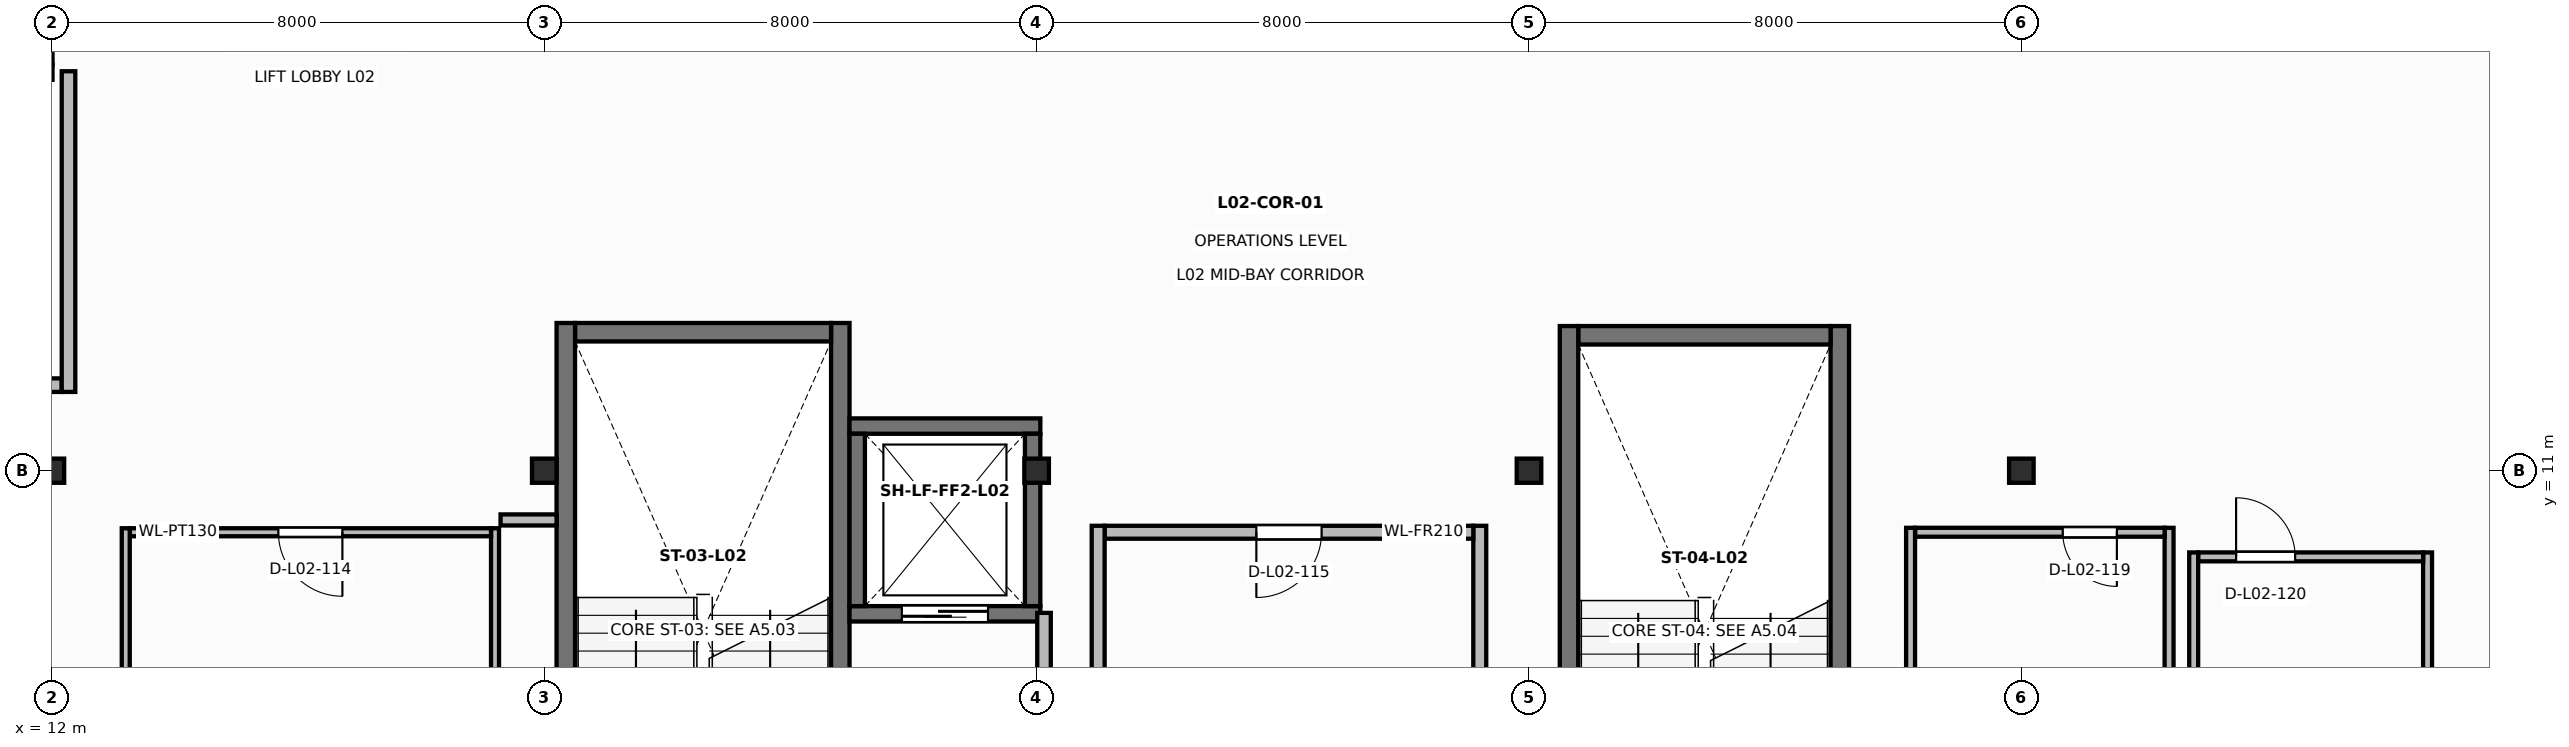
"""IFC4 building model, lengths in metres.
Left out: names, types, materials, properties, quantities, classifications, styles, units other than length and angle.
Written with IfcOpenShell. Run it as: python <this file> out.ifc"""

import sys

from ifc_helpers import new_model, si_unit, direction, frame, frame_2d, origin, origin_2d, place, context, subcontext, project, spatial, rectangle, i_section, extrude, element, fill, save


model = new_model("IFC4")
c1 = context("Model", 3, precision=1e-05, world=origin(), true_north=direction((0.0, 1.0)))
c2 = subcontext(c1, "Body", "Model", "MODEL_VIEW")
j1 = project(units=[si_unit("LENGTHUNIT", "METRE"), si_unit("PLANEANGLEUNIT", "RADIAN")], contexts=[c1])
p1 = place(None, origin())
s1 = spatial("IfcSite", under=j1, at=p1, CompositionType="ELEMENT")
p2 = place(p1, origin())
s2 = spatial("IfcBuilding", under=s1, at=p2, CompositionType="ELEMENT")
p3 = place(p2, frame((0.0, 0.0, 11.2)))
s3 = spatial("IfcBuildingStorey", under=s2, at=p3, CompositionType="ELEMENT", Elevation=11.2)
for number, where, z_axis, x_axis in (
    (1, (12.0, 11.0, 0.0), (0.0, 0.0, 1.0), (1.0, 0.0, 0.0)),
    (2, (20.0, 11.0, 0.0), (0.0, 0.0, 1.0), (1.0, 0.0, 0.0)),
    (3, (28.0, 11.0, 0.0), (0.0, 0.0, 1.0), (1.0, 0.0, 0.0)),
    (4, (36.0, 11.0, 0.0), (0.0, 0.0, 1.0), (1.0, 0.0, 0.0)),
    (5, (44.0, 11.0, 0.0), (0.0, 0.0, 1.0), (1.0, 0.0, 0.0)),
):
    element("IfcColumn", number, at=place(p3, frame(where, z_axis=z_axis, x_axis=x_axis)), inside=s3, PredefinedType="COLUMN", context=c2, shape_type="SweptSolid", body=[
        extrude(i_section(OverallWidth=0.399, OverallDepth=0.393, WebThickness=0.023, FlangeThickness=0.037, at=origin_2d()), origin(), (0.0, 0.0, 1.0), 4.4),
    ])
p4 = place(p3, frame((24.81, 3.4, 0.0), z_axis=(0.0, 0.0, 1.0), x_axis=(0.0, 1.0, 0.0)))
e6 = element("IfcWall", 6, at=p4, inside=s3, PredefinedType="SHEAR", context=c2, shape_type="SweptSolid", body=[
    extrude(rectangle(XDim=10.0, YDim=0.3, at=frame_2d((5.0, 0.0))), origin(), (0.0, 0.0, 1.0), 4.165),
])
p5 = place(p4, frame((0.75, 0.0, 0.0)))
e7 = element("IfcOpeningElement", 7, at=p5, cuts=e6, PredefinedType="OPENING", context=c2, shape_type="SweptSolid", body=[
    extrude(rectangle(XDim=1.1, YDim=2.15, at=frame_2d((0.55, 1.075))), frame((0.0, 0.16, 0.0), z_axis=(0.0, -1.0, 0.0), x_axis=(1.0, 0.0, 0.0)), (0.0, 0.0, 1.0), 0.32),
])
p6 = place(p3, frame((24.66, 13.25, 0.0), z_axis=(0.0, 0.0, 1.0), x_axis=(-1.0, 0.0, 0.0)))
e8 = element("IfcWall", 8, at=p6, inside=s3, PredefinedType="SHEAR", context=c2, shape_type="SweptSolid", body=[
    extrude(rectangle(XDim=4.16, YDim=0.3, at=frame_2d((2.08, 0.0))), origin(), (0.0, 0.0, 1.0), 4.165),
])
p7 = place(p3, frame((20.35, 13.4, 0.0), z_axis=(0.0, 0.0, 1.0), x_axis=(0.0, -1.0, 0.0)))
e9 = element("IfcWall", 9, at=p7, inside=s3, PredefinedType="SHEAR", context=c2, shape_type="SweptSolid", body=[
    extrude(rectangle(XDim=10.0, YDim=0.3, at=frame_2d((5.0, 0.0))), origin(), (0.0, 0.0, 1.0), 4.165),
])
p8 = place(p3, frame((41.05, 3.4, 0.0), z_axis=(0.0, 0.0, 1.0), x_axis=(0.0, 1.0, 0.0)))
e10 = element("IfcWall", 10, at=p8, inside=s3, PredefinedType="SHEAR", context=c2, shape_type="SweptSolid", body=[
    extrude(rectangle(XDim=9.95, YDim=0.3, at=frame_2d((4.975, 0.0))), origin(), (0.0, 0.0, 1.0), 4.165),
])
p9 = place(p8, frame((0.75, 0.0, 0.0)))
e11 = element("IfcOpeningElement", 11, at=p9, cuts=e10, PredefinedType="OPENING", context=c2, shape_type="SweptSolid", body=[
    extrude(rectangle(XDim=1.1, YDim=2.15, at=frame_2d((0.55, 1.075))), frame((0.0, 0.16, 0.0), z_axis=(0.0, -1.0, 0.0), x_axis=(1.0, 0.0, 0.0)), (0.0, 0.0, 1.0), 0.32),
])
p10 = place(p3, frame((40.9, 13.2, 0.0), z_axis=(0.0, 0.0, 1.0), x_axis=(-1.0, 0.0, 0.0)))
e12 = element("IfcWall", 12, at=p10, inside=s3, PredefinedType="SHEAR", context=c2, shape_type="SweptSolid", body=[
    extrude(rectangle(XDim=4.1, YDim=0.3, at=frame_2d((2.05, 0.0))), origin(), (0.0, 0.0, 1.0), 4.165),
])
p11 = place(p3, frame((36.65, 13.35, 0.0), z_axis=(0.0, 0.0, 1.0), x_axis=(0.0, -1.0, 0.0)))
e13 = element("IfcWall", 13, at=p11, inside=s3, PredefinedType="SHEAR", context=c2, shape_type="SweptSolid", body=[
    extrude(rectangle(XDim=9.95, YDim=0.3, at=frame_2d((4.975, 0.0))), origin(), (0.0, 0.0, 1.0), 4.165),
])
p12 = place(p3, frame((9.11, 17.475, 0.0), z_axis=(0.0, 0.0, 1.0), x_axis=(1.0, 0.0, 0.0)))
e14 = element("IfcWall", 14, at=p12, inside=s3, PredefinedType="SOLIDWALL", context=c2, shape_type="SweptSolid", body=[
    extrude(rectangle(XDim=2.9, YDim=0.25, at=frame_2d((1.45, 0.0))), origin(), (0.0, 0.0, 1.0), 4.165),
])
p13 = place(p12, frame((0.75, 0.0, 0.0)))
e15 = element("IfcOpeningElement", 15, at=p13, cuts=e14, PredefinedType="OPENING", context=c2, shape_type="SweptSolid", body=[
    extrude(rectangle(XDim=1.4, YDim=2.25, at=frame_2d((0.7, 1.125))), frame((0.0, 0.135, 0.0), z_axis=(0.0, -1.0, 0.0), x_axis=(1.0, 0.0, 0.0)), (0.0, 0.0, 1.0), 0.27),
])
p14 = place(p3, frame((11.885, 17.6, 0.0), z_axis=(0.0, 0.0, 1.0), x_axis=(0.0, 1.0, 0.0)))
e16 = element("IfcWall", 16, at=p14, inside=s3, PredefinedType="SOLIDWALL", context=c2, shape_type="SweptSolid", body=[
    extrude(rectangle(XDim=2.8, YDim=0.25, at=frame_2d((1.4, 0.0))), origin(), (0.0, 0.0, 1.0), 4.165),
])
p15 = place(p3, frame((9.12, 12.39, 0.0), z_axis=(0.0, 0.0, 1.0), x_axis=(1.0, 0.0, 0.0)))
e17 = element("IfcWall", 17, at=p15, inside=s3, PredefinedType="SOLIDWALL", context=c2, shape_type="SweptSolid", body=[
    extrude(rectangle(XDim=3.04, YDim=0.22, at=frame_2d((1.52, 0.0))), origin(), (0.0, 0.0, 1.0), 3.547),
])
p16 = place(p15, frame((0.805, 0.0, 0.0)))
e18 = element("IfcOpeningElement", 18, at=p16, cuts=e17, PredefinedType="OPENING", context=c2, shape_type="SweptSolid", body=[
    extrude(rectangle(XDim=1.15, YDim=2.15, at=frame_2d((0.575, 1.075))), frame((0.0, 0.12, 0.0), z_axis=(0.0, -1.0, 0.0), x_axis=(1.0, 0.0, 0.0)), (0.0, 0.0, 1.0), 0.24),
])
p17 = place(p3, frame((12.27, 12.28, 0.0), z_axis=(0.0, 0.0, 1.0), x_axis=(0.0, 1.0, 0.0)))
e19 = element("IfcWall", 19, at=p17, inside=s3, PredefinedType="SOLIDWALL", context=c2, shape_type="SweptSolid", body=[
    extrude(rectangle(XDim=5.21, YDim=0.22, at=frame_2d((2.605, 0.0))), origin(), (0.0, 0.0, 1.0), 4.165),
])
p18 = place(p3, frame((24.96, 8.675, 0.0), z_axis=(0.0, 0.0, 1.0), x_axis=(1.0, 0.0, 0.0)))
e20 = element("IfcWall", 20, at=p18, inside=s3, PredefinedType="SOLIDWALL", context=c2, shape_type="SweptSolid", body=[
    extrude(rectangle(XDim=3.1, YDim=0.25, at=frame_2d((1.55, 0.0))), origin(), (0.0, 0.0, 1.0), 4.165),
])
p19 = place(p18, frame((0.85, 0.0, 0.0)))
e21 = element("IfcOpeningElement", 21, at=p19, cuts=e20, PredefinedType="OPENING", context=c2, shape_type="SweptSolid", body=[
    extrude(rectangle(XDim=1.4, YDim=2.25, at=frame_2d((0.7, 1.125))), frame((0.0, 0.135, 0.0), z_axis=(0.0, -1.0, 0.0), x_axis=(1.0, 0.0, 0.0)), (0.0, 0.0, 1.0), 0.27),
])
p20 = place(p3, frame((28.06, 11.725, 0.0), z_axis=(0.0, 0.0, 1.0), x_axis=(-1.0, 0.0, 0.0)))
e22 = element("IfcWall", 22, at=p20, inside=s3, PredefinedType="SOLIDWALL", context=c2, shape_type="SweptSolid", body=[
    extrude(rectangle(XDim=3.1, YDim=0.25, at=frame_2d((1.55, 0.0))), origin(), (0.0, 0.0, 1.0), 4.165),
])
for number, where, z_axis, x_axis in (
    (23, (27.935, 8.8, 0.0), (0.0, 0.0, 1.0), (0.0, 1.0, 0.0)),
    (24, (25.085, 11.6, 0.0), (0.0, 0.0, 1.0), (0.0, -1.0, 0.0)),
):
    element("IfcWall", number, at=place(p3, frame(where, z_axis=z_axis, x_axis=x_axis)), inside=s3, PredefinedType="SOLIDWALL", context=c2, shape_type="SweptSolid", body=[
        extrude(rectangle(XDim=2.8, YDim=0.25, at=frame_2d((1.4, 0.0))), origin(), (0.0, 0.0, 1.0), 4.165),
    ])
p21 = place(p3, frame((28.12, 3.48, 0.0), z_axis=(0.0, 0.0, 1.0), x_axis=(0.0, 1.0, 0.0)))
e25 = element("IfcWall", 25, at=p21, inside=s3, PredefinedType="SOLIDWALL", context=c2, shape_type="SweptSolid", body=[
    extrude(rectangle(XDim=5.21, YDim=0.22, at=frame_2d((2.605, 0.0))), origin(), (0.0, 0.0, 1.0), 3.547),
])
p22 = place(p21, frame((2.245, 0.0, 0.0)))
e26 = element("IfcOpeningElement", 26, at=p22, cuts=e25, PredefinedType="OPENING", context=c2, shape_type="SweptSolid", body=[
    extrude(rectangle(XDim=1.15, YDim=2.15, at=frame_2d((0.575, 1.075))), frame((0.0, 0.12, 0.0), z_axis=(0.0, -1.0, 0.0), x_axis=(1.0, 0.0, 0.0)), (0.0, 0.0, 1.0), 0.24),
])
p23 = place(p3, frame((19.29, 10.2, 0.0), z_axis=(0.0, 0.0, 1.0), x_axis=(1.0, 0.0, 0.0)))
e27 = element("IfcWall", 27, at=p23, inside=s3, PredefinedType="PARTITIONING", context=c2, shape_type="SweptSolid", body=[
    extrude(rectangle(XDim=0.91, YDim=0.18, at=frame_2d((0.455, 0.0))), origin(), (0.0, 0.0, 1.0), 3.547),
])
p24 = place(p3, frame((19.2, 4.135, 0.0), z_axis=(0.0, 0.0, 1.0), x_axis=(0.0, 1.0, 0.0)))
e28 = element("IfcWall", 28, at=p24, inside=s3, PredefinedType="PARTITIONING", context=c2, shape_type="SweptSolid", body=[
    extrude(rectangle(XDim=5.93, YDim=0.13, at=frame_2d((2.965, 0.0))), origin(), (0.0, 0.0, 1.0), 4.12),
])
p25 = place(p3, frame((19.135, 10.0, 0.0), z_axis=(0.0, 0.0, 1.0), x_axis=(-1.0, 0.0, 0.0)))
e29 = element("IfcWall", 29, at=p25, inside=s3, PredefinedType="PARTITIONING", context=c2, shape_type="SweptSolid", body=[
    extrude(rectangle(XDim=5.87, YDim=0.13, at=frame_2d((2.935, 0.0))), origin(), (0.0, 0.0, 1.0), 4.12),
])
p26 = place(p25, frame((2.415, 0.0, 0.0)))
e30 = element("IfcOpeningElement", 30, at=p26, cuts=e29, PredefinedType="OPENING", context=c2, shape_type="SweptSolid", body=[
    extrude(rectangle(XDim=1.04, YDim=2.16, at=frame_2d((0.52, 1.08))), frame((0.0, 0.075, 0.0), z_axis=(0.0, -1.0, 0.0), x_axis=(1.0, 0.0, 0.0)), (0.0, 0.0, 1.0), 0.15),
])
p27 = place(p3, frame((13.2, 10.065, 0.0), z_axis=(0.0, 0.0, 1.0), x_axis=(0.0, -1.0, 0.0)))
e31 = element("IfcWall", 31, at=p27, inside=s3, PredefinedType="PARTITIONING", context=c2, shape_type="SweptSolid", body=[
    extrude(rectangle(XDim=5.93, YDim=0.13, at=frame_2d((2.965, 0.0))), origin(), (0.0, 0.0, 1.0), 4.12),
])
p28 = place(p3, frame((35.2, 4.095, 0.0), z_axis=(0.0, 0.0, 1.0), x_axis=(0.0, 1.0, 0.0)))
e32 = element("IfcWall", 32, at=p28, inside=s3, PredefinedType="SOLIDWALL", context=c2, shape_type="SweptSolid", body=[
    extrude(rectangle(XDim=6.01, YDim=0.21, at=frame_2d((3.005, 0.0))), origin(), (0.0, 0.0, 1.0), 3.811),
])
p29 = place(p3, frame((35.095, 10.0, 0.0), z_axis=(0.0, 0.0, 1.0), x_axis=(-1.0, 0.0, 0.0)))
e33 = element("IfcWall", 33, at=p29, inside=s3, PredefinedType="SOLIDWALL", context=c2, shape_type="SweptSolid", body=[
    extrude(rectangle(XDim=5.99, YDim=0.21, at=frame_2d((2.995, 0.0))), origin(), (0.0, 0.0, 1.0), 4.12),
])
p30 = place(p29, frame((2.465, 0.0, 0.0)))
e34 = element("IfcOpeningElement", 34, at=p30, cuts=e33, PredefinedType="OPENING", context=c2, shape_type="SweptSolid", body=[
    extrude(rectangle(XDim=1.06, YDim=2.16, at=frame_2d((0.53, 1.08))), frame((0.0, 0.115, 0.0), z_axis=(0.0, -1.0, 0.0), x_axis=(1.0, 0.0, 0.0)), (0.0, 0.0, 1.0), 0.23),
])
p31 = place(p3, frame((29.0, 10.105, 0.0), z_axis=(0.0, 0.0, 1.0), x_axis=(0.0, -1.0, 0.0)))
e35 = element("IfcWall", 35, at=p31, inside=s3, PredefinedType="SOLIDWALL", context=c2, shape_type="SweptSolid", body=[
    extrude(rectangle(XDim=6.01, YDim=0.21, at=frame_2d((3.005, 0.0))), origin(), (0.0, 0.0, 1.0), 3.811),
])
p32 = place(p3, frame((46.4, 4.128, 0.0), z_axis=(0.0, 0.0, 1.0), x_axis=(0.0, 1.0, 0.0)))
e36 = element("IfcWall", 36, at=p32, inside=s3, PredefinedType="PARTITIONING", context=c2, shape_type="SweptSolid", body=[
    extrude(rectangle(XDim=5.944, YDim=0.145, at=frame_2d((2.972, 0.0))), origin(), (0.0, 0.0, 1.0), 3.811),
])
p33 = place(p3, frame((46.328, 10.0, 0.0), z_axis=(0.0, 0.0, 1.0), x_axis=(-1.0, 0.0, 0.0)))
e37 = element("IfcWall", 37, at=p33, inside=s3, PredefinedType="PARTITIONING", context=c2, shape_type="SweptSolid", body=[
    extrude(rectangle(XDim=4.055, YDim=0.145, at=frame_2d((2.027, 0.0))), origin(), (0.0, 0.0, 1.0), 3.628),
])
p34 = place(p33, frame((0.776, 0.0, 0.0)))
e38 = element("IfcOpeningElement", 38, at=p34, cuts=e37, PredefinedType="OPENING", context=c2, shape_type="SweptSolid", body=[
    extrude(rectangle(XDim=0.88, YDim=2.08, at=frame_2d((0.44, 1.04))), frame((0.0, 0.083, 0.0), z_axis=(0.0, -1.0, 0.0), x_axis=(1.0, 0.0, 0.0)), (0.0, 0.0, 1.0), 0.165),
])
p35 = place(p3, frame((42.2, 10.072, 0.0), z_axis=(0.0, 0.0, 1.0), x_axis=(0.0, -1.0, 0.0)))
e39 = element("IfcWall", 39, at=p35, inside=s3, PredefinedType="PARTITIONING", context=c2, shape_type="SweptSolid", body=[
    extrude(rectangle(XDim=5.944, YDim=0.145, at=frame_2d((2.972, 0.0))), origin(), (0.0, 0.0, 1.0), 4.12),
])
p36 = place(p3, frame((50.6, 4.128, 0.0), z_axis=(0.0, 0.0, 1.0), x_axis=(0.0, 1.0, 0.0)))
e40 = element("IfcWall", 40, at=p36, inside=s3, PredefinedType="PARTITIONING", context=c2, shape_type="SweptSolid", body=[
    extrude(rectangle(XDim=5.544, YDim=0.145, at=frame_2d((2.772, 0.0))), origin(), (0.0, 0.0, 1.0), 3.811),
])
p37 = place(p3, frame((50.528, 9.6, 0.0), z_axis=(0.0, 0.0, 1.0), x_axis=(-1.0, 0.0, 0.0)))
e41 = element("IfcWall", 41, at=p37, inside=s3, PredefinedType="PARTITIONING", context=c2, shape_type="SweptSolid", body=[
    extrude(rectangle(XDim=3.656, YDim=0.145, at=frame_2d((1.828, 0.0))), origin(), (0.0, 0.0, 1.0), 4.12),
])
p38 = place(p37, frame((2.079, 0.0, 0.0)))
e42 = element("IfcOpeningElement", 42, at=p38, cuts=e41, PredefinedType="OPENING", context=c2, shape_type="SweptSolid", body=[
    extrude(rectangle(XDim=0.96, YDim=2.12, at=frame_2d((0.48, 1.06))), frame((0.0, 0.083, 0.0), z_axis=(0.0, -1.0, 0.0), x_axis=(1.0, 0.0, 0.0)), (0.0, 0.0, 1.0), 0.165),
])
p39 = place(p3, frame((46.8, 9.672, 0.0), z_axis=(0.0, 0.0, 1.0), x_axis=(0.0, -1.0, 0.0)))
e43 = element("IfcWall", 43, at=p39, inside=s3, PredefinedType="PARTITIONING", context=c2, shape_type="SweptSolid", body=[
    extrude(rectangle(XDim=5.544, YDim=0.145, at=frame_2d((2.772, 0.0))), origin(), (0.0, 0.0, 1.0), 3.811),
])
p40 = place(p19, frame((1.4, 0.0, 0.0), z_axis=(0.0, 0.0, 1.0), x_axis=(-1.0, 0.0, 0.0)))
e44 = element("IfcDoor", 44, at=p40, inside=s3, OperationType="DOUBLE_DOOR_SLIDING", PredefinedType="DOOR", context=c2, shape_type="SweptSolid", body=[
    extrude(rectangle(XDim=1.4, YDim=2.25, at=frame_2d((0.7, 1.125))), frame((0.0, 0.025, 0.0), z_axis=(0.0, -1.0, 0.0), x_axis=(1.0, 0.0, 0.0)), (0.0, 0.0, 1.0), 0.05),
])
fill(e21, e44)
p41 = place(p26, origin())
e45 = element("IfcDoor", 45, at=p41, inside=s3, OperationType="SINGLE_SWING_LEFT", PredefinedType="DOOR", context=c2, shape_type="SweptSolid", body=[
    extrude(rectangle(XDim=1.04, YDim=2.16, at=frame_2d((0.52, 1.08))), frame((0.0, 0.025, 0.0), z_axis=(0.0, -1.0, 0.0), x_axis=(1.0, 0.0, 0.0)), (0.0, 0.0, 1.0), 0.05),
])
fill(e30, e45)
p42 = place(p30, origin())
e46 = element("IfcDoor", 46, at=p42, inside=s3, OperationType="SINGLE_SWING_RIGHT", PredefinedType="DOOR", context=c2, shape_type="SweptSolid", body=[
    extrude(rectangle(XDim=1.06, YDim=2.16, at=frame_2d((0.53, 1.08))), frame((0.0, 0.025, 0.0), z_axis=(0.0, -1.0, 0.0), x_axis=(1.0, 0.0, 0.0)), (0.0, 0.0, 1.0), 0.05),
])
fill(e34, e46)
p43 = place(p34, origin())
e47 = element("IfcDoor", 47, at=p43, inside=s3, OperationType="SINGLE_SWING_LEFT", PredefinedType="DOOR", context=c2, shape_type="SweptSolid", body=[
    extrude(rectangle(XDim=0.88, YDim=2.08, at=frame_2d((0.44, 1.04))), frame((0.0, 0.025, 0.0), z_axis=(0.0, -1.0, 0.0), x_axis=(1.0, 0.0, 0.0)), (0.0, 0.0, 1.0), 0.05),
])
fill(e38, e47)
p44 = place(p38, frame((0.96, 0.0, 0.0), z_axis=(0.0, 0.0, 1.0), x_axis=(-1.0, 0.0, 0.0)))
e48 = element("IfcDoor", 48, at=p44, inside=s3, OperationType="SINGLE_SWING_RIGHT", PredefinedType="DOOR", context=c2, shape_type="SweptSolid", body=[
    extrude(rectangle(XDim=0.96, YDim=2.12, at=frame_2d((0.48, 1.06))), frame((0.0, 0.025, 0.0), z_axis=(0.0, -1.0, 0.0), x_axis=(1.0, 0.0, 0.0)), (0.0, 0.0, 1.0), 0.05),
])
fill(e42, e48)
save(model, sys.argv[1])
